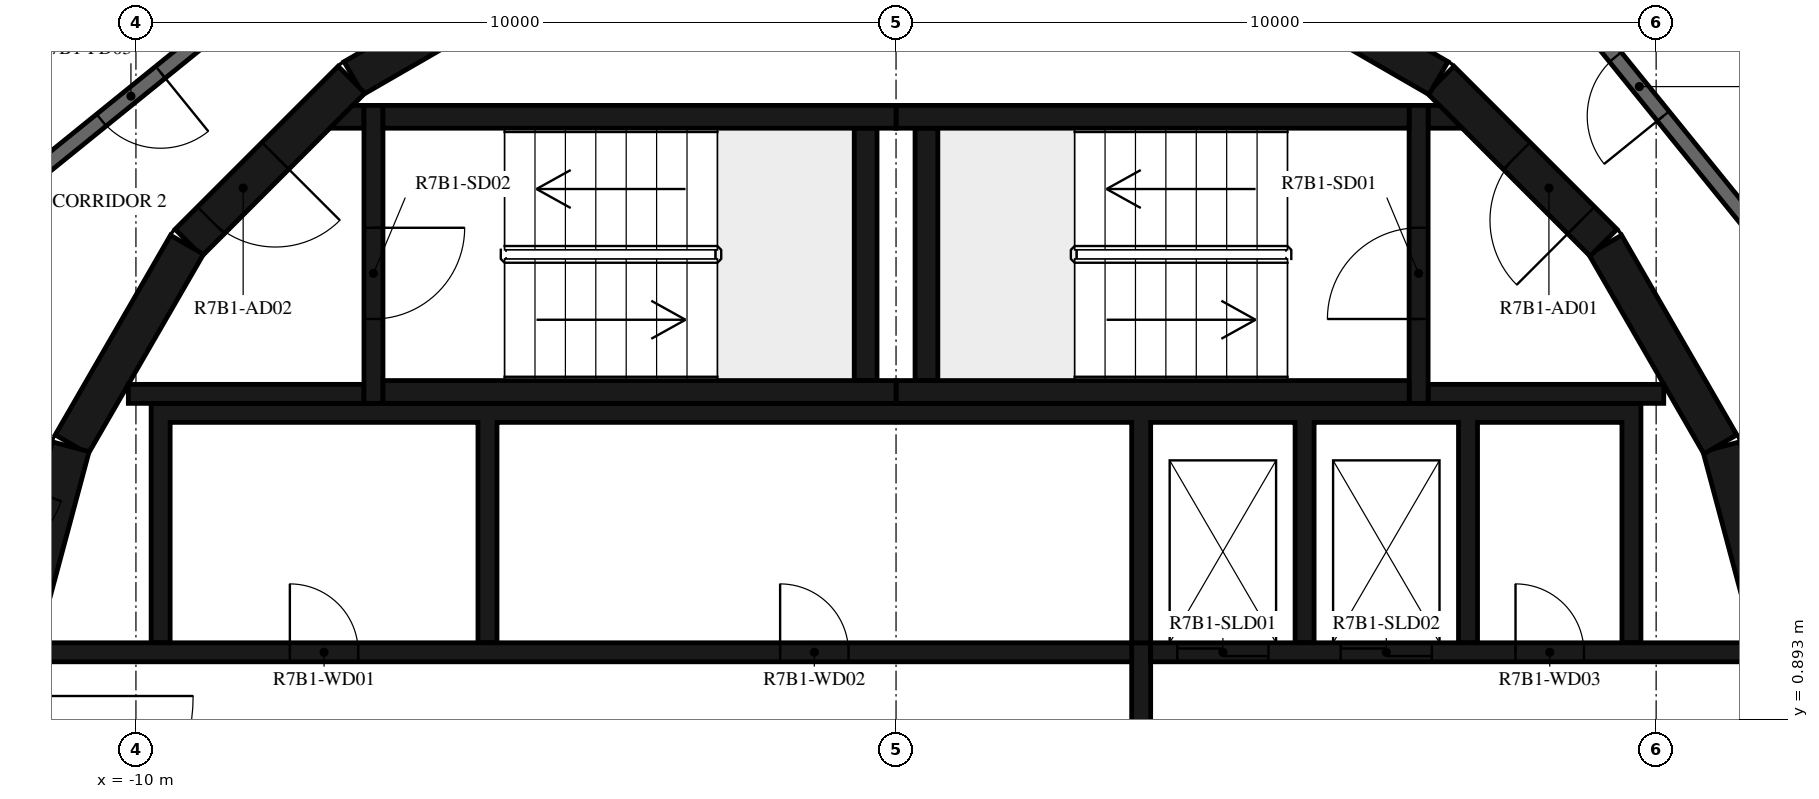
"""IFC4 building model, lengths in metres.
Left out: names, types, materials, properties, quantities, classifications, styles, units other than length and angle.
Written with IfcOpenShell. Run it as: python <this file> out.ifc"""

import sys

from ifc_helpers import new_model, si_unit, direction, frame, frame_2d, origin, place, context, subcontext, project, spatial, polyline, rectangle, outline, extrude, element, fill, save


model = new_model("IFC4")
c1 = context("Model", 3, precision=1e-05, world=origin(), true_north=direction((0.0, 1.0)))
c2 = subcontext(c1, "Body", "Model", "MODEL_VIEW")
j1 = project(units=[si_unit("LENGTHUNIT", "METRE"), si_unit("PLANEANGLEUNIT", "RADIAN")], contexts=[c1])
p1 = place(None, origin())
s1 = spatial("IfcSite", under=j1, at=p1, CompositionType="ELEMENT")
p2 = place(p1, origin())
s2 = spatial("IfcBuilding", under=s1, at=p2, CompositionType="ELEMENT")
p3 = place(p2, frame((0.0, 0.0, 273.9)))
s3 = spatial("IfcBuildingStorey", under=s2, at=p3, CompositionType="ELEMENT", Elevation=273.9)
for number, where, z_axis, x_axis in (
    (1, (11.643, 1.55, 0.0), (0.0, 0.0, 1.0), (-0.259, 0.966, 0.0)),
    (2, (10.845, 4.51, 0.0), (0.0, 0.0, 1.0), (-0.5, 0.866, 0.0)),
):
    element("IfcWall", number, at=place(p3, frame(where, z_axis=z_axis, x_axis=x_axis)), inside=s3, PredefinedType="SHEAR", context=c2, shape_type="SweptSolid", body=[
        extrude(rectangle(XDim=3.033, YDim=0.5, at=frame_2d((1.516, 0.0))), origin(), (0.0, 0.0, 1.0), 3.12),
    ])
p4 = place(p3, frame((9.308, 7.164, 0.0), z_axis=(0.0, 0.0, 1.0), x_axis=(-0.707106781187, 0.707106781187, 0.0)))
e3 = element("IfcWall", 3, at=p4, inside=s3, PredefinedType="SHEAR", context=c2, shape_type="SweptSolid", body=[
    extrude(rectangle(XDim=3.032, YDim=0.5, at=frame_2d((1.516, 0.0))), origin(), (0.0, 0.0, 1.0), 3.12),
])
p5 = place(p4, frame((0.416, 0.0, 0.0)))
e4 = element("IfcOpeningElement", 4, at=p5, cuts=e3, PredefinedType="OPENING", context=c2, shape_type="SweptSolid", body=[
    extrude(rectangle(XDim=1.2, YDim=2.1, at=frame_2d((0.6, 1.05))), frame((0.0, 0.26, 0.0), z_axis=(0.0, -1.0, 0.0), x_axis=(1.0, 0.0, 0.0)), (0.0, 0.0, 1.0), 0.52),
])
for number, where, z_axis, x_axis in (
    (5, (7.137, 9.329, 0.0), (0.0, 0.0, 1.0), (-0.866, 0.5, 0.0)),
    (6, (-4.51, 10.845, 0.0), (0.0, 0.0, 1.0), (-0.866, -0.5, 0.0)),
):
    element("IfcWall", number, at=place(p3, frame(where, z_axis=z_axis, x_axis=x_axis)), inside=s3, PredefinedType="SHEAR", context=c2, shape_type="SweptSolid", body=[
        extrude(rectangle(XDim=3.033, YDim=0.5, at=frame_2d((1.516, 0.0))), origin(), (0.0, 0.0, 1.0), 3.12),
    ])
p6 = place(p3, frame((-7.164, 9.308, 0.0), z_axis=(0.0, 0.0, 1.0), x_axis=(-0.707106781187, -0.707106781187, 0.0)))
e7 = element("IfcWall", 7, at=p6, inside=s3, PredefinedType="SHEAR", context=c2, shape_type="SweptSolid", body=[
    extrude(rectangle(XDim=3.032, YDim=0.5, at=frame_2d((1.516, 0.0))), origin(), (0.0, 0.0, 1.0), 3.12),
])
p7 = place(p6, frame((1.416, 0.0, 0.0)))
e8 = element("IfcOpeningElement", 8, at=p7, cuts=e7, PredefinedType="OPENING", context=c2, shape_type="SweptSolid", body=[
    extrude(rectangle(XDim=1.2, YDim=2.1, at=frame_2d((0.6, 1.05))), frame((0.0, 0.26, 0.0), z_axis=(0.0, -1.0, 0.0), x_axis=(1.0, 0.0, 0.0)), (0.0, 0.0, 1.0), 0.52),
])
for number, where, z_axis, x_axis in (
    (9, (-9.329, 7.137, 0.0), (0.0, 0.0, 1.0), (-0.5, -0.866, 0.0)),
    (10, (-10.858, 4.479, 0.0), (0.0, 0.0, 1.0), (-0.259, -0.966, 0.0)),
):
    element("IfcWall", number, at=place(p3, frame(where, z_axis=z_axis, x_axis=x_axis)), inside=s3, PredefinedType="SHEAR", context=c2, shape_type="SweptSolid", body=[
        extrude(rectangle(XDim=3.033, YDim=0.5, at=frame_2d((1.516, 0.0))), origin(), (0.0, 0.0, 1.0), 3.12),
    ])
for number, where, z_axis, x_axis in (
    (11, (0.0, 5.2, 0.0), (0.0, 0.0, 1.0), (1.0, 0.0, 0.0)),
    (12, (0.0, 8.82, 0.0), (0.0, 0.0, 1.0), (1.0, 0.0, 0.0)),
):
    element("IfcWall", number, at=place(p3, frame(where, z_axis=z_axis, x_axis=x_axis)), inside=s3, PredefinedType="SHEAR", context=c2, shape_type="SweptSolid", body=[
        extrude(rectangle(XDim=6.75, YDim=0.3, at=frame_2d((3.375, 0.0))), origin(), (0.0, 0.0, 1.0), 3.12),
    ])
p8 = place(p3, frame((0.4, 5.35, 0.0), z_axis=(0.0, 0.0, 1.0), x_axis=(0.0, 1.0, 0.0)))
e13 = element("IfcWall", 13, at=p8, inside=s3, PredefinedType="SHEAR", context=c2, shape_type="SweptSolid", body=[
    extrude(rectangle(XDim=3.32, YDim=0.3, at=frame_2d((1.66, 0.0))), origin(), (0.0, 0.0, 1.0), 3.12),
])
p9 = place(p3, frame((6.875, 5.05, 0.0), z_axis=(0.0, 0.0, 1.0), x_axis=(0.0, 1.0, 0.0)))
e14 = element("IfcWall", 14, at=p9, inside=s3, PredefinedType="SHEAR", context=c2, shape_type="SweptSolid", body=[
    extrude(rectangle(XDim=3.92, YDim=0.25, at=frame_2d((1.96, 0.0))), origin(), (0.0, 0.0, 1.0), 3.12),
])
p10 = place(p9, frame((1.11, 0.0, 0.0)))
e15 = element("IfcOpeningElement", 15, at=p10, cuts=e14, PredefinedType="OPENING", context=c2, shape_type="SweptSolid", body=[
    extrude(rectangle(XDim=1.2, YDim=2.1, at=frame_2d((0.6, 1.05))), frame((0.0, 0.135, 0.0), z_axis=(0.0, -1.0, 0.0), x_axis=(1.0, 0.0, 0.0)), (0.0, 0.0, 1.0), 0.27),
])
p11 = place(p3, frame((7.0, 5.175, 0.0), z_axis=(0.0, 0.0, 1.0), x_axis=(1.0, 0.0, 0.0)))
e16 = element("IfcWall", 16, at=p11, inside=s3, PredefinedType="SHEAR", context=c2, shape_type="SweptSolid", body=[
    extrude(rectangle(XDim=3.1, YDim=0.25, at=frame_2d((1.55, 0.0))), origin(), (0.0, 0.0, 1.0), 3.12),
])
p12 = place(p3, origin())
e17 = element("IfcWall", 17, at=p12, inside=s3, PredefinedType="SHEAR", context=c2, shape_type="SweptSolid", body=[
    extrude(outline(polyline([(7.448, 8.67), (7.0, 8.67), (7.0, 8.97), (7.148, 8.97), (7.448, 8.67)])), origin(), (0.0, 0.0, 1.0), 3.12),
])
for number, where, z_axis, x_axis in (
    (18, (-6.75, 5.2, 0.0), (0.0, 0.0, 1.0), (1.0, 0.0, 0.0)),
    (19, (-6.75, 8.82, 0.0), (0.0, 0.0, 1.0), (1.0, 0.0, 0.0)),
):
    element("IfcWall", number, at=place(p3, frame(where, z_axis=z_axis, x_axis=x_axis)), inside=s3, PredefinedType="SHEAR", context=c2, shape_type="SweptSolid", body=[
        extrude(rectangle(XDim=6.75, YDim=0.3, at=frame_2d((3.375, 0.0))), origin(), (0.0, 0.0, 1.0), 3.12),
    ])
p13 = place(p3, frame((-0.4, 5.35, 0.0), z_axis=(0.0, 0.0, 1.0), x_axis=(0.0, 1.0, 0.0)))
e20 = element("IfcWall", 20, at=p13, inside=s3, PredefinedType="SHEAR", context=c2, shape_type="SweptSolid", body=[
    extrude(rectangle(XDim=3.32, YDim=0.3, at=frame_2d((1.66, 0.0))), origin(), (0.0, 0.0, 1.0), 3.12),
])
p14 = place(p3, frame((-6.875, 8.97, 0.0), z_axis=(0.0, 0.0, 1.0), x_axis=(0.0, -1.0, 0.0)))
e21 = element("IfcWall", 21, at=p14, inside=s3, PredefinedType="SHEAR", context=c2, shape_type="SweptSolid", body=[
    extrude(rectangle(XDim=3.92, YDim=0.25, at=frame_2d((1.96, 0.0))), origin(), (0.0, 0.0, 1.0), 3.12),
])
p15 = place(p14, frame((1.61, 0.0, 0.0)))
e22 = element("IfcOpeningElement", 22, at=p15, cuts=e21, PredefinedType="OPENING", context=c2, shape_type="SweptSolid", body=[
    extrude(rectangle(XDim=1.2, YDim=2.1, at=frame_2d((0.6, 1.05))), frame((0.0, 0.135, 0.0), z_axis=(0.0, -1.0, 0.0), x_axis=(1.0, 0.0, 0.0)), (0.0, 0.0, 1.0), 0.27),
])
p16 = place(p3, frame((-7.0, 5.175, 0.0), z_axis=(0.0, 0.0, 1.0), x_axis=(-1.0, 0.0, 0.0)))
e23 = element("IfcWall", 23, at=p16, inside=s3, PredefinedType="SHEAR", context=c2, shape_type="SweptSolid", body=[
    extrude(rectangle(XDim=3.1, YDim=0.25, at=frame_2d((1.55, 0.0))), origin(), (0.0, 0.0, 1.0), 3.12),
])
p17 = place(p3, origin())
e24 = element("IfcWall", 24, at=p17, inside=s3, PredefinedType="SHEAR", context=c2, shape_type="SweptSolid", body=[
    extrude(outline(polyline([(-7.148, 8.97), (-7.0, 8.97), (-7.0, 8.67), (-7.448, 8.67), (-7.148, 8.97)])), origin(), (0.0, 0.0, 1.0), 3.12),
])
p18 = place(p3, origin())
e25 = element("IfcWall", 25, at=p18, inside=s3, PredefinedType="SHEAR", context=c2, shape_type="SweptSolid", body=[
    extrude(outline(polyline([(-9.8, 1.9), (-9.55, 1.9), (-9.55, 4.8), (-5.5, 4.8), (-5.5, 1.9), (-5.25, 1.9), (-5.25, 4.8), (3.1, 4.8), (3.1, 1.9), (3.35, 1.9), (3.35, 4.8), (5.25, 4.8), (5.25, 1.9), (5.5, 1.9), (5.5, 4.8), (7.4, 4.8), (7.4, 1.9), (7.65, 1.9), (7.65, 4.8), (9.55, 4.8), (9.55, 1.9), (9.8, 1.9), (9.8, 4.8), (9.8, 5.05), (-9.8, 5.05), (-9.8, 4.8), (-9.8, 1.9)])), origin(), (0.0, 0.0, 1.0), 3.12),
])
p19 = place(p3, frame((-11.28, 1.775, 0.0), z_axis=(0.0, 0.0, 1.0), x_axis=(1.0, 0.0, 0.0)))
e26 = element("IfcWall", 26, at=p19, inside=s3, PredefinedType="SHEAR", context=c2, shape_type="SweptSolid", body=[
    extrude(rectangle(XDim=14.38, YDim=0.25, at=frame_2d((7.19, 0.0))), origin(), (0.0, 0.0, 1.0), 3.12),
])
p20 = place(p19, frame((3.305, 0.0, 0.0)))
e27 = element("IfcOpeningElement", 27, at=p20, cuts=e26, PredefinedType="OPENING", context=c2, shape_type="SweptSolid", body=[
    extrude(rectangle(XDim=0.9, YDim=2.1, at=frame_2d((0.45, 1.05))), frame((0.0, 0.135, 0.0), z_axis=(0.0, -1.0, 0.0), x_axis=(1.0, 0.0, 0.0)), (0.0, 0.0, 1.0), 0.27),
])
p21 = place(p19, frame((9.755, 0.0, 0.0)))
e28 = element("IfcOpeningElement", 28, at=p21, cuts=e26, PredefinedType="OPENING", context=c2, shape_type="SweptSolid", body=[
    extrude(rectangle(XDim=0.9, YDim=2.1, at=frame_2d((0.45, 1.05))), frame((0.0, 0.135, 0.0), z_axis=(0.0, -1.0, 0.0), x_axis=(1.0, 0.0, 0.0)), (0.0, 0.0, 1.0), 0.27),
])
p22 = place(p3, frame((3.35, 1.775, 0.0), z_axis=(0.0, 0.0, 1.0), x_axis=(1.0, 0.0, 0.0)))
e29 = element("IfcWall", 29, at=p22, inside=s3, PredefinedType="SHEAR", context=c2, shape_type="SweptSolid", body=[
    extrude(rectangle(XDim=7.93, YDim=0.25, at=frame_2d((3.965, 0.0))), origin(), (0.0, 0.0, 1.0), 3.12),
])
p23 = place(p22, frame((0.35, 0.0, 0.0)))
e30 = element("IfcOpeningElement", 30, at=p23, cuts=e29, PredefinedType="OPENING", context=c2, shape_type="SweptSolid", body=[
    extrude(rectangle(XDim=1.2, YDim=2.4, at=frame_2d((0.6, 1.2))), frame((0.0, 0.135, 0.0), z_axis=(0.0, -1.0, 0.0), x_axis=(1.0, 0.0, 0.0)), (0.0, 0.0, 1.0), 0.27),
])
p24 = place(p22, frame((2.5, 0.0, 0.0)))
e31 = element("IfcOpeningElement", 31, at=p24, cuts=e29, PredefinedType="OPENING", context=c2, shape_type="SweptSolid", body=[
    extrude(rectangle(XDim=1.2, YDim=2.4, at=frame_2d((0.6, 1.2))), frame((0.0, 0.135, 0.0), z_axis=(0.0, -1.0, 0.0), x_axis=(1.0, 0.0, 0.0)), (0.0, 0.0, 1.0), 0.27),
])
p25 = place(p22, frame((4.8, 0.0, 0.0)))
e32 = element("IfcOpeningElement", 32, at=p25, cuts=e29, PredefinedType="OPENING", context=c2, shape_type="SweptSolid", body=[
    extrude(rectangle(XDim=0.9, YDim=2.1, at=frame_2d((0.45, 1.05))), frame((0.0, 0.135, 0.0), z_axis=(0.0, -1.0, 0.0), x_axis=(1.0, 0.0, 0.0)), (0.0, 0.0, 1.0), 0.27),
])
p26 = place(p3, frame((3.225, -1.9, 0.0), z_axis=(0.0, 0.0, 1.0), x_axis=(0.0, 1.0, 0.0)))
e33 = element("IfcWall", 33, at=p26, inside=s3, PredefinedType="SHEAR", context=c2, shape_type="SweptSolid", body=[
    extrude(rectangle(XDim=3.8, YDim=0.25, at=frame_2d((1.9, 0.0))), origin(), (0.0, 0.0, 1.0), 3.12),
])
p27 = place(p3, frame((12.673, 5.643, 0.0), z_axis=(0.0, 0.0, 1.0), x_axis=(-0.629302871585, 0.777160148113, 0.0)))
e34 = element("IfcWall", 34, at=p27, inside=s3, PredefinedType="STANDARD", context=c2, shape_type="SweptSolid", body=[
    extrude(rectangle(XDim=7.181, YDim=0.2, at=frame_2d((3.59, 0.0))), origin(), (0.0, 0.0, 1.0), 3.12),
])
p28 = place(p27, frame((4.1, 0.0, 0.0)))
e35 = element("IfcOpeningElement", 35, at=p28, cuts=e34, PredefinedType="OPENING", context=c2, shape_type="SweptSolid", body=[
    extrude(rectangle(XDim=1.0, YDim=2.1, at=frame_2d((0.5, 1.05))), frame((0.0, 0.11, 0.0), z_axis=(0.0, -1.0, 0.0), x_axis=(1.0, 0.0, 0.0)), (0.0, 0.0, 1.0), 0.22),
])
p29 = place(p3, frame((-5.643, 12.673, 0.0), z_axis=(0.0, 0.0, 1.0), x_axis=(-0.777160148113, -0.629302871585, 0.0)))
e36 = element("IfcWall", 36, at=p29, inside=s3, PredefinedType="STANDARD", context=c2, shape_type="SweptSolid", body=[
    extrude(rectangle(XDim=7.181, YDim=0.2, at=frame_2d((3.59, 0.0))), origin(), (0.0, 0.0, 1.0), 3.12),
])
p30 = place(p29, frame((2.39, 0.0, 0.0)))
e37 = element("IfcOpeningElement", 37, at=p30, cuts=e36, PredefinedType="OPENING", context=c2, shape_type="SweptSolid", body=[
    extrude(rectangle(XDim=1.0, YDim=2.1, at=frame_2d((0.5, 1.05))), frame((0.0, 0.11, 0.0), z_axis=(0.0, -1.0, 0.0), x_axis=(1.0, 0.0, 0.0)), (0.0, 0.0, 1.0), 0.22),
])
p31 = place(p29, frame((5.192, 0.0, 0.0)))
e38 = element("IfcOpeningElement", 38, at=p31, cuts=e36, PredefinedType="OPENING", context=c2, shape_type="SweptSolid", body=[
    extrude(rectangle(XDim=1.0, YDim=2.1, at=frame_2d((0.5, 1.05))), frame((0.0, 0.11, 0.0), z_axis=(0.0, -1.0, 0.0), x_axis=(1.0, 0.0, 0.0)), (0.0, 0.0, 1.0), 0.22),
])
p32 = place(p3, frame((14.092, 6.274, 0.0), z_axis=(0.0, 0.0, 1.0), x_axis=(-0.62933367237, 0.777135206268, 0.0)))
e39 = element("IfcWall", 39, at=p32, inside=s3, PredefinedType="PARTITIONING", context=c2, shape_type="SweptSolid", body=[
    extrude(rectangle(XDim=7.985, YDim=0.12, at=frame_2d((3.992, 0.0))), origin(), (0.0, 0.0, 1.0), 3.12),
])
p33 = place(p32, frame((2.073, 0.0, 0.0)))
e40 = element("IfcOpeningElement", 40, at=p33, cuts=e39, PredefinedType="OPENING", context=c2, shape_type="SweptSolid", body=[
    extrude(rectangle(XDim=0.9, YDim=2.1, at=frame_2d((0.45, 1.05))), frame((0.0, 0.07, 0.0), z_axis=(0.0, -1.0, 0.0), x_axis=(1.0, 0.0, 0.0)), (0.0, 0.0, 1.0), 0.14),
])
p34 = place(p10, origin())
e41 = element("IfcDoor", 41, at=p34, inside=s3, OperationType="SINGLE_SWING_LEFT", PredefinedType="DOOR", context=c2, shape_type="SweptSolid", body=[
    extrude(rectangle(XDim=1.2, YDim=2.1, at=frame_2d((0.6, 1.05))), frame((0.0, 0.025, 0.0), z_axis=(0.0, -1.0, 0.0), x_axis=(1.0, 0.0, 0.0)), (0.0, 0.0, 1.0), 0.05),
])
fill(e15, e41)
p35 = place(p5, origin())
e42 = element("IfcDoor", 42, at=p35, inside=s3, OperationType="SINGLE_SWING_RIGHT", PredefinedType="DOOR", context=c2, shape_type="SweptSolid", body=[
    extrude(rectangle(XDim=1.2, YDim=2.1, at=frame_2d((0.6, 1.05))), frame((0.0, 0.025, 0.0), z_axis=(0.0, -1.0, 0.0), x_axis=(1.0, 0.0, 0.0)), (0.0, 0.0, 1.0), 0.05),
])
fill(e4, e42)
p36 = place(p15, origin())
e43 = element("IfcDoor", 43, at=p36, inside=s3, OperationType="SINGLE_SWING_LEFT", PredefinedType="DOOR", context=c2, shape_type="SweptSolid", body=[
    extrude(rectangle(XDim=1.2, YDim=2.1, at=frame_2d((0.6, 1.05))), frame((0.0, 0.025, 0.0), z_axis=(0.0, -1.0, 0.0), x_axis=(1.0, 0.0, 0.0)), (0.0, 0.0, 1.0), 0.05),
])
fill(e22, e43)
p37 = place(p7, origin())
e44 = element("IfcDoor", 44, at=p37, inside=s3, OperationType="SINGLE_SWING_RIGHT", PredefinedType="DOOR", context=c2, shape_type="SweptSolid", body=[
    extrude(rectangle(XDim=1.2, YDim=2.1, at=frame_2d((0.6, 1.05))), frame((0.0, 0.025, 0.0), z_axis=(0.0, -1.0, 0.0), x_axis=(1.0, 0.0, 0.0)), (0.0, 0.0, 1.0), 0.05),
])
fill(e8, e44)
p38 = place(p23, origin())
e45 = element("IfcDoor", 45, at=p38, inside=s3, OperationType="DOUBLE_DOOR_SLIDING", PredefinedType="DOOR", context=c2, shape_type="SweptSolid", body=[
    extrude(rectangle(XDim=1.2, YDim=2.4, at=frame_2d((0.6, 1.2))), frame((0.0, 0.025, 0.0), z_axis=(0.0, -1.0, 0.0), x_axis=(1.0, 0.0, 0.0)), (0.0, 0.0, 1.0), 0.05),
])
fill(e30, e45)
p39 = place(p24, origin())
e46 = element("IfcDoor", 46, at=p39, inside=s3, OperationType="DOUBLE_DOOR_SLIDING", PredefinedType="DOOR", context=c2, shape_type="SweptSolid", body=[
    extrude(rectangle(XDim=1.2, YDim=2.4, at=frame_2d((0.6, 1.2))), frame((0.0, 0.025, 0.0), z_axis=(0.0, -1.0, 0.0), x_axis=(1.0, 0.0, 0.0)), (0.0, 0.0, 1.0), 0.05),
])
fill(e31, e46)
p40 = place(p20, origin())
e47 = element("IfcDoor", 47, at=p40, inside=s3, OperationType="SINGLE_SWING_LEFT", PredefinedType="DOOR", context=c2, shape_type="SweptSolid", body=[
    extrude(rectangle(XDim=0.9, YDim=2.1, at=frame_2d((0.45, 1.05))), frame((0.0, 0.025, 0.0), z_axis=(0.0, -1.0, 0.0), x_axis=(1.0, 0.0, 0.0)), (0.0, 0.0, 1.0), 0.05),
])
fill(e27, e47)
p41 = place(p21, origin())
e48 = element("IfcDoor", 48, at=p41, inside=s3, OperationType="SINGLE_SWING_RIGHT", PredefinedType="DOOR", context=c2, shape_type="SweptSolid", body=[
    extrude(rectangle(XDim=0.9, YDim=2.1, at=frame_2d((0.45, 1.05))), frame((0.0, 0.025, 0.0), z_axis=(0.0, -1.0, 0.0), x_axis=(1.0, 0.0, 0.0)), (0.0, 0.0, 1.0), 0.05),
])
fill(e28, e48)
p42 = place(p25, origin())
e49 = element("IfcDoor", 49, at=p42, inside=s3, OperationType="SINGLE_SWING_LEFT", PredefinedType="DOOR", context=c2, shape_type="SweptSolid", body=[
    extrude(rectangle(XDim=0.9, YDim=2.1, at=frame_2d((0.45, 1.05))), frame((0.0, 0.025, 0.0), z_axis=(0.0, -1.0, 0.0), x_axis=(1.0, 0.0, 0.0)), (0.0, 0.0, 1.0), 0.05),
])
fill(e32, e49)
p43 = place(p28, origin())
e50 = element("IfcDoor", 50, at=p43, inside=s3, OperationType="SINGLE_SWING_LEFT", PredefinedType="DOOR", context=c2, shape_type="SweptSolid", body=[
    extrude(rectangle(XDim=1.0, YDim=2.1, at=frame_2d((0.5, 1.05))), frame((0.0, 0.025, 0.0), z_axis=(0.0, -1.0, 0.0), x_axis=(1.0, 0.0, 0.0)), (0.0, 0.0, 1.0), 0.05),
])
fill(e35, e50)
p44 = place(p31, origin())
e51 = element("IfcDoor", 51, at=p44, inside=s3, OperationType="SINGLE_SWING_LEFT", PredefinedType="DOOR", context=c2, shape_type="SweptSolid", body=[
    extrude(rectangle(XDim=1.0, YDim=2.1, at=frame_2d((0.5, 1.05))), frame((0.0, 0.025, 0.0), z_axis=(0.0, -1.0, 0.0), x_axis=(1.0, 0.0, 0.0)), (0.0, 0.0, 1.0), 0.05),
])
fill(e38, e51)
save(model, sys.argv[1])
